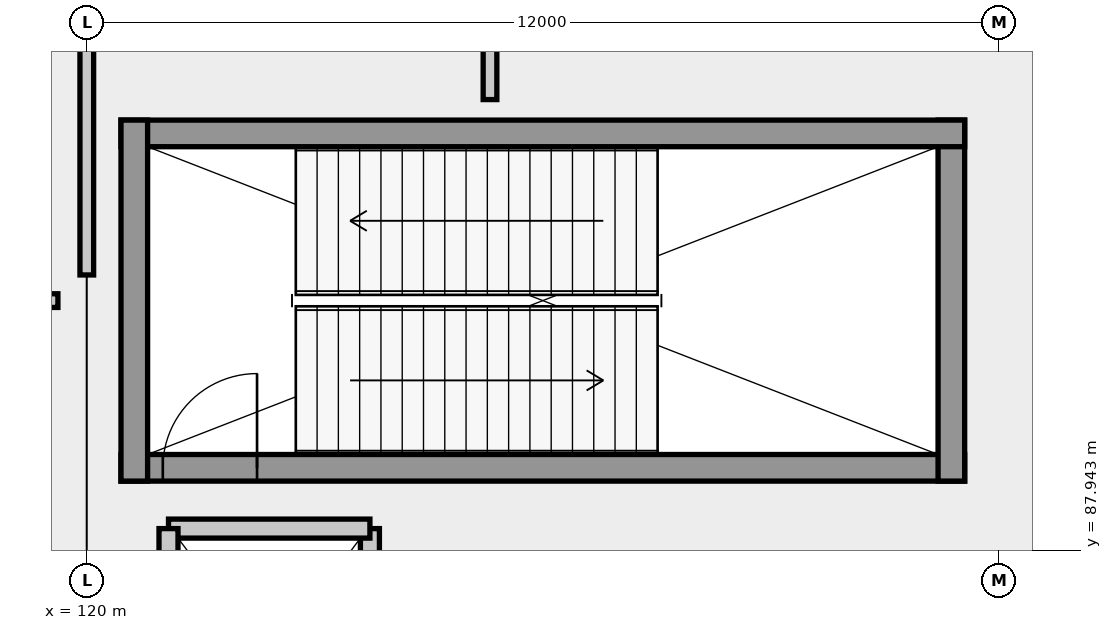
"""IFC4 building model, lengths in metres.
Left out: names, types, materials, properties, quantities, classifications, styles, units other than length and angle.
Written with IfcOpenShell. Run it as: python <this file> out.ifc"""

import sys

from ifc_helpers import new_model, si_unit, direction, frame, frame_2d, origin, place, context, subcontext, project, spatial, rectangle, extrude, element, fill, save


model = new_model("IFC4")
c1 = context("Model", 3, precision=1e-05, world=origin(), true_north=direction((0.0, 1.0)))
c2 = subcontext(c1, "Body", "Model", "MODEL_VIEW")
j1 = project(units=[si_unit("LENGTHUNIT", "METRE"), si_unit("PLANEANGLEUNIT", "RADIAN")], contexts=[c1])
p1 = place(None, origin())
s1 = spatial("IfcSite", under=j1, at=p1, CompositionType="ELEMENT")
p2 = place(p1, origin())
s2 = spatial("IfcBuilding", under=s1, at=p2, CompositionType="ELEMENT")
p3 = place(p2, frame((0.0, 0.0, 16.8)))
s3 = spatial("IfcBuildingStorey", under=s2, at=p3, CompositionType="ELEMENT", Elevation=16.8)
p4 = place(p3, frame((120.45, 89.025, 0.0), z_axis=(0.0, 0.0, 1.0), x_axis=(1.0, 0.0, 0.0)))
e1 = element("IfcWall", 1, at=p4, inside=s3, PredefinedType="SHEAR", context=c2, shape_type="SweptSolid", body=[
    extrude(rectangle(XDim=11.1, YDim=0.35, at=frame_2d((5.55, 0.0))), origin(), (0.0, 0.0, 1.0), 6.35),
])
p5 = place(p4, frame((0.55, 0.0, 0.0)))
e2 = element("IfcOpeningElement", 2, at=p5, cuts=e1, PredefinedType="OPENING", context=c2, shape_type="SweptSolid", body=[
    extrude(rectangle(XDim=1.24, YDim=2.25, at=frame_2d((0.62, 1.125))), frame((0.0, 0.185, 0.0), z_axis=(0.0, -1.0, 0.0), x_axis=(1.0, 0.0, 0.0)), (0.0, 0.0, 1.0), 0.37),
])
p6 = place(p3, frame((131.375, 88.85, 0.0), z_axis=(0.0, 0.0, 1.0), x_axis=(0.0, 1.0, 0.0)))
e3 = element("IfcWall", 3, at=p6, inside=s3, PredefinedType="SHEAR", context=c2, shape_type="SweptSolid", body=[
    extrude(rectangle(XDim=4.75, YDim=0.35, at=frame_2d((2.375, 0.0))), origin(), (0.0, 0.0, 1.0), 6.35),
])
p7 = place(p3, frame((131.55, 93.425, 0.0), z_axis=(0.0, 0.0, 1.0), x_axis=(-1.0, 0.0, 0.0)))
e4 = element("IfcWall", 4, at=p7, inside=s3, PredefinedType="SHEAR", context=c2, shape_type="SweptSolid", body=[
    extrude(rectangle(XDim=11.1, YDim=0.35, at=frame_2d((5.55, 0.0))), origin(), (0.0, 0.0, 1.0), 6.35),
])
p8 = place(p3, frame((120.625, 93.6, 0.0), z_axis=(0.0, 0.0, 1.0), x_axis=(0.0, -1.0, 0.0)))
e5 = element("IfcWall", 5, at=p8, inside=s3, PredefinedType="SHEAR", context=c2, shape_type="SweptSolid", body=[
    extrude(rectangle(XDim=4.75, YDim=0.35, at=frame_2d((2.375, 0.0))), origin(), (0.0, 0.0, 1.0), 6.35),
])
p9 = place(p3, frame((123.725, 84.775, 0.0), z_axis=(0.0, 0.0, 1.0), x_axis=(0.0, 1.0, 0.0)))
e6 = element("IfcWall", 6, at=p9, inside=s3, PredefinedType="SOLIDWALL", context=c2, shape_type="SweptSolid", body=[
    extrude(rectangle(XDim=3.45, YDim=0.25, at=frame_2d((1.725, 0.0))), origin(), (0.0, 0.0, 1.0), 6.35),
])
p10 = place(p9, frame((1.1, 0.0, 0.0)))
e7 = element("IfcOpeningElement", 7, at=p10, cuts=e6, PredefinedType="OPENING", context=c2, shape_type="SweptSolid", body=[
    extrude(rectangle(XDim=1.25, YDim=2.25, at=frame_2d((0.625, 1.125))), frame((0.0, 0.135, 0.0), z_axis=(0.0, -1.0, 0.0), x_axis=(1.0, 0.0, 0.0)), (0.0, 0.0, 1.0), 0.27),
])
p11 = place(p3, frame((123.725, 88.225, 0.0), z_axis=(0.0, 0.0, 1.0), x_axis=(-1.0, 0.0, 0.0)))
e8 = element("IfcWall", 8, at=p11, inside=s3, PredefinedType="SOLIDWALL", context=c2, shape_type="SweptSolid", body=[
    extrude(rectangle(XDim=2.65, YDim=0.25, at=frame_2d((1.325, 0.0))), origin(), (0.0, 0.0, 1.0), 6.35),
])
p12 = place(p3, frame((121.075, 88.225, 0.0), z_axis=(0.0, 0.0, 1.0), x_axis=(0.0, -1.0, 0.0)))
e9 = element("IfcWall", 9, at=p12, inside=s3, PredefinedType="SOLIDWALL", context=c2, shape_type="SweptSolid", body=[
    extrude(rectangle(XDim=3.45, YDim=0.25, at=frame_2d((1.725, 0.0))), origin(), (0.0, 0.0, 1.0), 6.35),
])
p13 = place(p3, frame((107.82, 91.225, 0.0), z_axis=(0.0, 0.0, 1.0), x_axis=(1.0, 0.0, 0.0)))
e10 = element("IfcWall", 10, at=p13, inside=s3, PredefinedType="PARTITIONING", context=c2, shape_type="SweptSolid", body=[
    extrude(rectangle(XDim=11.8, YDim=0.18, at=frame_2d((5.9, 0.0))), origin(), (0.0, 0.0, 1.0), 5.82),
])
p14 = place(p13, frame((4.55, 0.0, 0.0)))
e11 = element("IfcOpeningElement", 11, at=p14, cuts=e10, PredefinedType="OPENING", context=c2, shape_type="SweptSolid", body=[
    extrude(rectangle(XDim=2.7, YDim=2.85, at=frame_2d((1.35, 1.425))), frame((0.0, 0.1, 0.0), z_axis=(0.0, -1.0, 0.0), x_axis=(1.0, 0.0, 0.0)), (0.0, 0.0, 1.0), 0.2),
])
p15 = place(p3, frame((120.0, 91.562, 0.0), z_axis=(0.0, 0.0, 1.0), x_axis=(0.0, 1.0, 0.0)))
e12 = element("IfcWall", 12, at=p15, inside=s3, PredefinedType="PARTITIONING", context=c2, shape_type="SweptSolid", body=[
    extrude(rectangle(XDim=15.88, YDim=0.18, at=frame_2d((7.94, 0.0))), origin(), (0.0, 0.0, 1.0), 5.87),
])
p16 = place(p15, frame((10.441, 0.0, 0.0)))
e13 = element("IfcOpeningElement", 13, at=p16, cuts=e12, PredefinedType="OPENING", context=c2, shape_type="SweptSolid", body=[
    extrude(rectangle(XDim=1.35, YDim=2.3, at=frame_2d((0.675, 1.15))), frame((0.0, 0.1, 0.0), z_axis=(0.0, -1.0, 0.0), x_axis=(1.0, 0.0, 0.0)), (0.0, 0.0, 1.0), 0.2),
])
p17 = place(p3, frame((125.305, 93.87, 0.0), z_axis=(0.0, 0.0, 1.0), x_axis=(0.0, 1.0, 0.0)))
e14 = element("IfcWall", 14, at=p17, inside=s3, PredefinedType="PARTITIONING", context=c2, shape_type="SweptSolid", body=[
    extrude(rectangle(XDim=2.61, YDim=0.18, at=frame_2d((1.305, 0.0))), origin(), (0.0, 0.0, 1.0), 5.87),
])
p18 = place(p17, frame((0.65, 0.0, 0.0)))
e15 = element("IfcOpeningElement", 15, at=p18, cuts=e14, PredefinedType="OPENING", context=c2, shape_type="SweptSolid", body=[
    extrude(rectangle(XDim=1.05, YDim=2.2, at=frame_2d((0.525, 1.1))), frame((0.0, 0.1, 0.0), z_axis=(0.0, -1.0, 0.0), x_axis=(1.0, 0.0, 0.0)), (0.0, 0.0, 1.0), 0.2),
])
p19 = place(p5, origin())
e16 = element("IfcDoor", 16, at=p19, inside=s3, OperationType="SINGLE_SWING_RIGHT", PredefinedType="DOOR", context=c2, shape_type="SweptSolid", body=[
    extrude(rectangle(XDim=1.24, YDim=2.25, at=frame_2d((0.62, 1.125))), frame((0.0, 0.025, 0.0), z_axis=(0.0, -1.0, 0.0), x_axis=(1.0, 0.0, 0.0)), (0.0, 0.0, 1.0), 0.05),
])
fill(e2, e16)
save(model, sys.argv[1])
